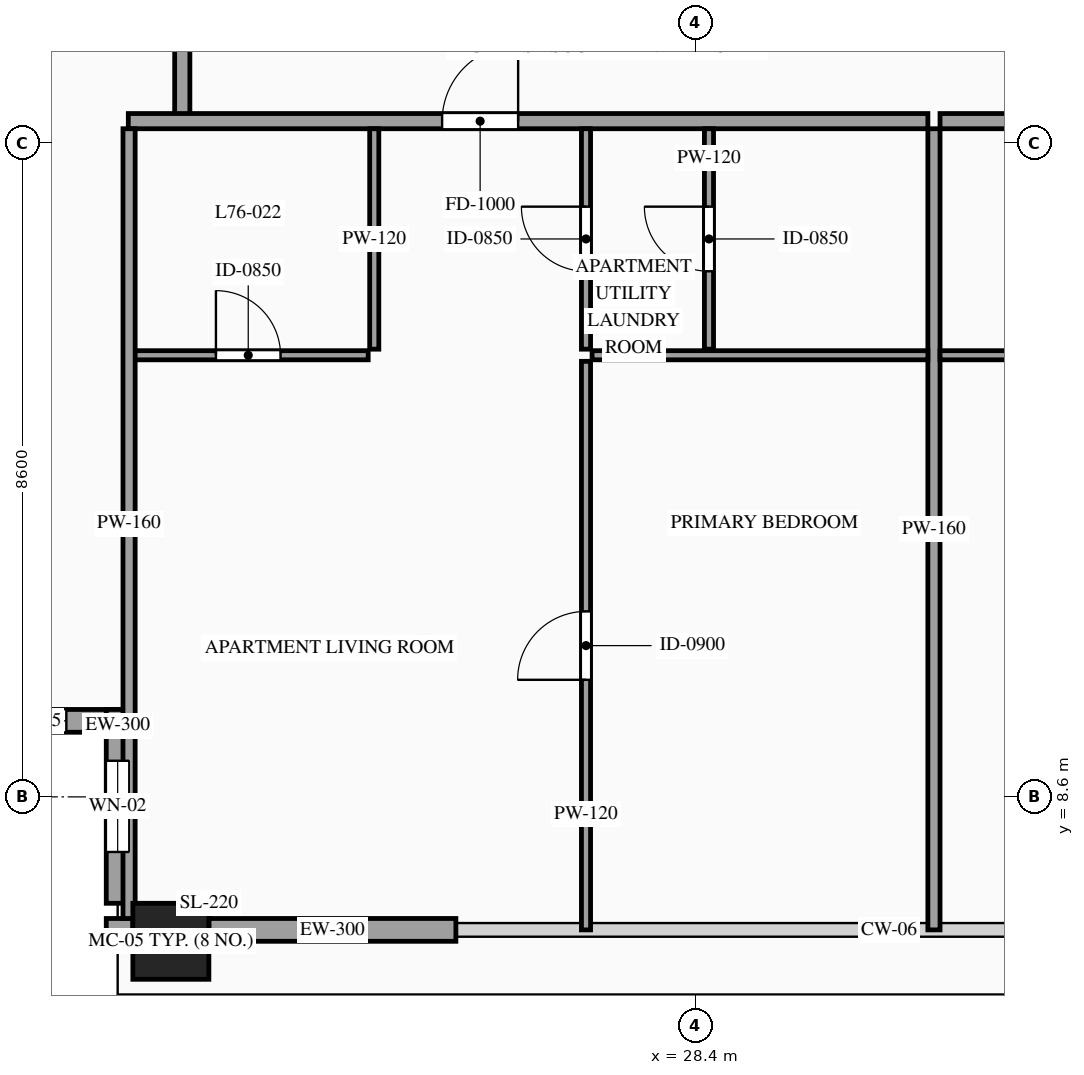
"""IFC4 building model, lengths in metres.
Left out: names, types, materials, properties, quantities, classifications, styles, units other than length and angle.
Written with IfcOpenShell. Run it as: python <this file> out.ifc"""

import sys

from ifc_helpers import new_model, si_unit, direction, frame, frame_2d, origin, origin_2d, place, context, subcontext, project, spatial, rectangle, hollow_rectangle, extrude, source, transform, mapped, element, fill, save


model = new_model("IFC4")
c1 = context("Model", 3, precision=1e-05, world=origin(), true_north=direction((0.0, 1.0)))
c2 = subcontext(c1, "Body", "Model", "MODEL_VIEW")
j1 = project(units=[si_unit("LENGTHUNIT", "METRE"), si_unit("PLANEANGLEUNIT", "RADIAN")], contexts=[c1])
p1 = place(None, origin())
s1 = spatial("IfcSite", under=j1, at=p1, CompositionType="ELEMENT")
p2 = place(p1, origin())
s2 = spatial("IfcBuilding", under=s1, at=p2, CompositionType="ELEMENT")
p3 = place(p2, frame((0.0, 0.0, 285.6)))
s3 = spatial("IfcBuildingStorey", under=s2, at=p3, CompositionType="ELEMENT", Elevation=285.6)
m1 = source(origin(), c2, "Body", "SweptSolid", [
    extrude(hollow_rectangle(XDim=1.0, YDim=1.0, WallThickness=0.048, at=origin_2d()), origin(), (0.0, 0.0, 1.0), 3.5),
])
p4 = place(p3, frame((21.5, 6.7, 0.0), z_axis=(0.0, 0.0, 1.0), x_axis=(1.0, 0.0, 0.0)))
e1 = element("IfcColumn", 1, at=p4, inside=s3, PredefinedType="COLUMN", context=c2, shape_type="MappedRepresentation", body=[
    mapped(m1, transform((0.0, 0.0, 0.0), scale=1.0)),
])
p5 = place(p3, frame((18.4, 9.6, 0.0), z_axis=(0.0, 0.0, 1.0), x_axis=(1.0, 0.0, 0.0)))
e2 = element("IfcWall", 2, at=p5, inside=s3, PredefinedType="SOLIDWALL", context=c2, shape_type="SweptSolid", body=[
    extrude(rectangle(XDim=2.55, YDim=0.3, at=frame_2d((1.275, 0.0))), origin(), (0.0, 0.0, 1.0), 3.28),
])
p6 = place(p5, frame((0.825, 0.0, 0.85)))
e3 = element("IfcOpeningElement", 3, at=p6, cuts=e2, PredefinedType="OPENING", context=c2, shape_type="SweptSolid", body=[
    extrude(rectangle(XDim=0.9, YDim=1.5, at=frame_2d((0.45, 0.75))), frame((0.0, 0.165, 0.0), z_axis=(0.0, -1.0, 0.0), x_axis=(1.0, 0.0, 0.0)), (0.0, 0.0, 1.0), 0.33),
])
p7 = place(p3, frame((20.8, 9.75, 0.0), z_axis=(0.0, 0.0, 1.0), x_axis=(0.0, -1.0, 0.0)))
e4 = element("IfcWall", 4, at=p7, inside=s3, PredefinedType="SOLIDWALL", context=c2, shape_type="SweptSolid", body=[
    extrude(rectangle(XDim=2.55, YDim=0.3, at=frame_2d((1.275, 0.0))), origin(), (0.0, 0.0, 1.0), 3.28),
])
p8 = place(p7, frame((0.675, 0.0, 0.85)))
e5 = element("IfcOpeningElement", 5, at=p8, cuts=e4, PredefinedType="OPENING", context=c2, shape_type="SweptSolid", body=[
    extrude(rectangle(XDim=1.2, YDim=2.1, at=frame_2d((0.6, 1.05))), frame((0.0, 0.165, 0.0), z_axis=(0.0, -1.0, 0.0), x_axis=(1.0, 0.0, 0.0)), (0.0, 0.0, 1.0), 0.33),
])
m2 = source(origin(), c2, "Body", "SweptSolid", [
    extrude(rectangle(XDim=0.35, YDim=0.3, at=frame_2d((0.175, 0.0))), origin(), (0.0, 0.0, 1.0), 3.28),
])
p9 = place(p3, frame((20.65, 6.85, 0.0), z_axis=(0.0, 0.0, 1.0), x_axis=(1.0, 0.0, 0.0)))
e6 = element("IfcWall", 6, at=p9, inside=s3, PredefinedType="SOLIDWALL", context=c2, shape_type="MappedRepresentation", body=[
    mapped(m2, transform((0.0, 0.0, 0.0), scale=1.0)),
])
m3 = source(origin(), c2, "Body", "SweptSolid", [
    extrude(rectangle(XDim=3.25, YDim=0.3, at=frame_2d((1.625, 0.0))), origin(), (0.0, 0.0, 1.0), 2.885),
])
p10 = place(p3, frame((22.0, 6.85, 0.0), z_axis=(0.0, 0.0, 1.0), x_axis=(1.0, 0.0, 0.0)))
e7 = element("IfcWall", 7, at=p10, inside=s3, PredefinedType="SOLIDWALL", context=c2, shape_type="MappedRepresentation", body=[
    mapped(m3, transform((0.0, 0.0, 0.0), scale=1.0)),
])
m4 = source(origin(), c2, "Body", "SweptSolid", [
    extrude(rectangle(XDim=1.7, YDim=0.2, at=frame_2d((0.85, 0.0))), origin(), (0.0, 0.0, 1.0), 3.28),
])
p11 = place(p3, frame((21.65, 17.55, 0.0), z_axis=(0.0, 0.0, 1.0), x_axis=(0.0, 1.0, 0.0)))
e8 = element("IfcWall", 8, at=p11, inside=s3, PredefinedType="PARTITIONING", context=c2, shape_type="MappedRepresentation", body=[
    mapped(m4, transform((0.0, 0.0, 0.0), scale=1.0)),
])
p12 = place(p3, frame((20.94, 17.49, 0.0), z_axis=(0.0, 0.0, 1.0), x_axis=(1.0, 0.0, 0.0)))
e9 = element("IfcWall", 9, at=p12, inside=s3, PredefinedType="PARTITIONING", context=c2, shape_type="SweptSolid", body=[
    extrude(rectangle(XDim=10.52, YDim=0.2, at=frame_2d((5.26, 0.0))), origin(), (0.0, 0.0, 1.0), 3.28),
])
p13 = place(p12, frame((4.129, 0.0, 0.0)))
e10 = element("IfcOpeningElement", 10, at=p13, cuts=e9, PredefinedType="OPENING", context=c2, shape_type="SweptSolid", body=[
    extrude(rectangle(XDim=1.0, YDim=2.2, at=frame_2d((0.5, 1.1))), frame((0.0, 0.115, 0.0), z_axis=(0.0, -1.0, 0.0), x_axis=(1.0, 0.0, 0.0)), (0.0, 0.0, 1.0), 0.23),
])
m5 = source(origin(), c2, "Body", "SweptSolid", [
    extrude(rectangle(XDim=10.54, YDim=0.16, at=frame_2d((5.27, 0.0))), origin(), (0.0, 0.0, 1.0), 3.28),
])
p14 = place(p3, frame((31.54, 6.85, 0.0), z_axis=(0.0, 0.0, 1.0), x_axis=(0.0, 1.0, 0.0)))
e11 = element("IfcWall", 11, at=p14, inside=s3, PredefinedType="PARTITIONING", context=c2, shape_type="MappedRepresentation", body=[
    mapped(m5, transform((0.0, 0.0, 0.0), scale=1.0)),
])
p15 = place(p3, frame((20.94, 14.41, 0.0), z_axis=(0.0, 0.0, 1.0), x_axis=(1.0, 0.0, 0.0)))
e12 = element("IfcWall", 12, at=p15, inside=s3, PredefinedType="PARTITIONING", context=c2, shape_type="SweptSolid", body=[
    extrude(rectangle(XDim=3.156, YDim=0.12, at=frame_2d((1.578, 0.0))), origin(), (0.0, 0.0, 1.0), 3.28),
])
p16 = place(p15, frame((1.153, 0.0, 0.0)))
e13 = element("IfcOpeningElement", 13, at=p16, cuts=e12, PredefinedType="OPENING", context=c2, shape_type="SweptSolid", body=[
    extrude(rectangle(XDim=0.85, YDim=2.1, at=frame_2d((0.425, 1.05))), frame((0.0, 0.075, 0.0), z_axis=(0.0, -1.0, 0.0), x_axis=(1.0, 0.0, 0.0)), (0.0, 0.0, 1.0), 0.15),
])
m6 = source(origin(), c2, "Body", "SweptSolid", [
    extrude(rectangle(XDim=2.9, YDim=0.12, at=frame_2d((1.45, 0.0))), origin(), (0.0, 0.0, 1.0), 3.28),
])
p17 = place(p3, frame((24.176, 14.49, 0.0), z_axis=(0.0, 0.0, 1.0), x_axis=(0.0, 1.0, 0.0)))
e14 = element("IfcWall", 14, at=p17, inside=s3, PredefinedType="PARTITIONING", context=c2, shape_type="MappedRepresentation", body=[
    mapped(m6, transform((0.0, 0.0, 0.0), scale=1.0)),
])
p18 = place(p3, frame((28.58, 14.49, 0.0), z_axis=(0.0, 0.0, 1.0), x_axis=(0.0, 1.0, 0.0)))
e15 = element("IfcWall", 15, at=p18, inside=s3, PredefinedType="PARTITIONING", context=c2, shape_type="SweptSolid", body=[
    extrude(rectangle(XDim=2.9, YDim=0.12, at=frame_2d((1.45, 0.0))), origin(), (0.0, 0.0, 1.0), 3.28),
])
p19 = place(p18, frame((1.025, 0.0, 0.0)))
e16 = element("IfcOpeningElement", 16, at=p19, cuts=e15, PredefinedType="OPENING", context=c2, shape_type="SweptSolid", body=[
    extrude(rectangle(XDim=0.85, YDim=2.1, at=frame_2d((0.425, 1.05))), frame((0.0, 0.075, 0.0), z_axis=(0.0, -1.0, 0.0), x_axis=(1.0, 0.0, 0.0)), (0.0, 0.0, 1.0), 0.15),
])
m7 = source(origin(), c2, "Body", "SweptSolid", [
    extrude(rectangle(XDim=4.418, YDim=0.12, at=frame_2d((2.209, 0.0))), origin(), (0.0, 0.0, 1.0), 3.28),
])
p20 = place(p3, frame((27.042, 14.41, 0.0), z_axis=(0.0, 0.0, 1.0), x_axis=(1.0, 0.0, 0.0)))
e17 = element("IfcWall", 17, at=p20, inside=s3, PredefinedType="PARTITIONING", context=c2, shape_type="MappedRepresentation", body=[
    mapped(m7, transform((0.0, 0.0, 0.0), scale=1.0)),
])
p21 = place(p3, frame((26.962, 6.85, 0.0), z_axis=(0.0, 0.0, 1.0), x_axis=(0.0, 1.0, 0.0)))
e18 = element("IfcWall", 18, at=p21, inside=s3, PredefinedType="PARTITIONING", context=c2, shape_type="SweptSolid", body=[
    extrude(rectangle(XDim=7.48, YDim=0.12, at=frame_2d((3.74, 0.0))), origin(), (0.0, 0.0, 1.0), 3.28),
])
p22 = place(p21, frame((3.29, 0.0, 0.0)))
e19 = element("IfcOpeningElement", 19, at=p22, cuts=e18, PredefinedType="OPENING", context=c2, shape_type="SweptSolid", body=[
    extrude(rectangle(XDim=0.9, YDim=2.15, at=frame_2d((0.45, 1.075))), frame((0.0, 0.075, 0.0), z_axis=(0.0, -1.0, 0.0), x_axis=(1.0, 0.0, 0.0)), (0.0, 0.0, 1.0), 0.15),
])
p23 = place(p3, frame((26.962, 14.49, 0.0), z_axis=(0.0, 0.0, 1.0), x_axis=(0.0, 1.0, 0.0)))
e20 = element("IfcWall", 20, at=p23, inside=s3, PredefinedType="PARTITIONING", context=c2, shape_type="SweptSolid", body=[
    extrude(rectangle(XDim=2.9, YDim=0.12, at=frame_2d((1.45, 0.0))), origin(), (0.0, 0.0, 1.0), 3.28),
])
p24 = place(p23, frame((1.025, 0.0, 0.0)))
e21 = element("IfcOpeningElement", 21, at=p24, cuts=e20, PredefinedType="OPENING", context=c2, shape_type="SweptSolid", body=[
    extrude(rectangle(XDim=0.85, YDim=2.1, at=frame_2d((0.425, 1.05))), frame((0.0, 0.075, 0.0), z_axis=(0.0, -1.0, 0.0), x_axis=(1.0, 0.0, 0.0)), (0.0, 0.0, 1.0), 0.15),
])
p25 = place(p3, frame((31.62, 17.49, 0.0), z_axis=(0.0, 0.0, 1.0), x_axis=(1.0, 0.0, 0.0)))
e22 = element("IfcWall", 22, at=p25, inside=s3, PredefinedType="PARTITIONING", context=c2, shape_type="SweptSolid", body=[
    extrude(rectangle(XDim=10.76, YDim=0.2, at=frame_2d((5.38, 0.0))), origin(), (0.0, 0.0, 1.0), 3.28),
])
p26 = place(p25, frame((4.235, 0.0, 0.0)))
e23 = element("IfcOpeningElement", 23, at=p26, cuts=e22, PredefinedType="OPENING", context=c2, shape_type="SweptSolid", body=[
    extrude(rectangle(XDim=1.0, YDim=2.2, at=frame_2d((0.5, 1.1))), frame((0.0, 0.115, 0.0), z_axis=(0.0, -1.0, 0.0), x_axis=(1.0, 0.0, 0.0)), (0.0, 0.0, 1.0), 0.23),
])
p27 = place(p3, frame((31.62, 14.41, 0.0), z_axis=(0.0, 0.0, 1.0), x_axis=(1.0, 0.0, 0.0)))
e24 = element("IfcWall", 24, at=p27, inside=s3, PredefinedType="PARTITIONING", context=c2, shape_type="SweptSolid", body=[
    extrude(rectangle(XDim=3.228, YDim=0.12, at=frame_2d((1.614, 0.0))), origin(), (0.0, 0.0, 1.0), 3.28),
])
p28 = place(p27, frame((1.189, 0.0, 0.0)))
e25 = element("IfcOpeningElement", 25, at=p28, cuts=e24, PredefinedType="OPENING", context=c2, shape_type="SweptSolid", body=[
    extrude(rectangle(XDim=0.85, YDim=2.1, at=frame_2d((0.425, 1.05))), frame((0.0, 0.075, 0.0), z_axis=(0.0, -1.0, 0.0), x_axis=(1.0, 0.0, 0.0)), (0.0, 0.0, 1.0), 0.15),
])
m8 = source(origin(), c2, "Body", "SweptSolid", [
    extrude(rectangle(XDim=10.39, YDim=0.16, at=frame_2d((5.195, 0.0))), origin(), (0.0, 0.0, 1.0), 3.28),
])
p29 = place(p3, frame((20.95, 7.0, 0.0), z_axis=(0.0, 0.0, 1.0), x_axis=(0.0, 1.0, 0.0)))
e26 = element("IfcWall", 26, at=p29, inside=s3, PredefinedType="PARTITIONING", context=c2, shape_type="MappedRepresentation", body=[
    mapped(m8, transform((0.0, 0.0, 0.0), scale=1.0)),
])
m9 = source(origin(), c2, "Body", "SweptSolid", [
    extrude(rectangle(XDim=0.9, YDim=1.5, at=frame_2d((0.45, 0.75))), frame((0.0, 0.03, 0.0), z_axis=(0.0, -1.0, 0.0), x_axis=(1.0, 0.0, 0.0)), (0.0, 0.0, 1.0), 0.06),
])
p30 = place(p6, origin())
e27 = element("IfcWindow", 27, at=p30, inside=s3, PartitioningType="SINGLE_PANEL", PredefinedType="WINDOW", context=c2, shape_type="MappedRepresentation", body=[
    mapped(m9, transform((0.0, 0.0, 0.0), scale=1.0)),
])
fill(e3, e27)
m10 = source(origin(), c2, "Body", "SweptSolid", [
    extrude(rectangle(XDim=1.2, YDim=2.1, at=frame_2d((0.6, 1.05))), frame((0.0, 0.03, 0.0), z_axis=(0.0, -1.0, 0.0), x_axis=(1.0, 0.0, 0.0)), (0.0, 0.0, 1.0), 0.06),
])
p31 = place(p8, origin())
e28 = element("IfcWindow", 28, at=p31, inside=s3, PartitioningType="SINGLE_PANEL", PredefinedType="WINDOW", context=c2, shape_type="MappedRepresentation", body=[
    mapped(m10, transform((0.0, 0.0, 0.0), scale=1.0)),
])
fill(e5, e28)
m11 = source(origin(), c2, "Body", "SweptSolid", [
    extrude(rectangle(XDim=1.0, YDim=2.2, at=frame_2d((0.5, 1.1))), frame((0.0, 0.025, 0.0), z_axis=(0.0, -1.0, 0.0), x_axis=(1.0, 0.0, 0.0)), (0.0, 0.0, 1.0), 0.05),
])
p32 = place(p13, origin())
e29 = element("IfcDoor", 29, at=p32, inside=s3, OperationType="SINGLE_SWING_RIGHT", PredefinedType="DOOR", context=c2, shape_type="MappedRepresentation", body=[
    mapped(m11, transform((0.0, 0.0, 0.0), scale=1.0)),
])
fill(e10, e29)
m12 = source(origin(), c2, "Body", "SweptSolid", [
    extrude(rectangle(XDim=0.85, YDim=2.1, at=frame_2d((0.425, 1.05))), frame((0.0, 0.025, 0.0), z_axis=(0.0, -1.0, 0.0), x_axis=(1.0, 0.0, 0.0)), (0.0, 0.0, 1.0), 0.05),
])
p33 = place(p16, origin())
e30 = element("IfcDoor", 30, at=p33, inside=s3, OperationType="SINGLE_SWING_LEFT", PredefinedType="DOOR", context=c2, shape_type="MappedRepresentation", body=[
    mapped(m12, transform((0.0, 0.0, 0.0), scale=1.0)),
])
fill(e13, e30)
p34 = place(p19, origin())
e31 = element("IfcDoor", 31, at=p34, inside=s3, OperationType="SINGLE_SWING_RIGHT", PredefinedType="DOOR", context=c2, shape_type="MappedRepresentation", body=[
    mapped(m12, transform((0.0, 0.0, 0.0), scale=1.0)),
])
fill(e16, e31)
m13 = source(origin(), c2, "Body", "SweptSolid", [
    extrude(rectangle(XDim=0.9, YDim=2.15, at=frame_2d((0.45, 1.075))), frame((0.0, 0.025, 0.0), z_axis=(0.0, -1.0, 0.0), x_axis=(1.0, 0.0, 0.0)), (0.0, 0.0, 1.0), 0.05),
])
p35 = place(p22, origin())
e32 = element("IfcDoor", 32, at=p35, inside=s3, OperationType="SINGLE_SWING_LEFT", PredefinedType="DOOR", context=c2, shape_type="MappedRepresentation", body=[
    mapped(m13, transform((0.0, 0.0, 0.0), scale=1.0)),
])
fill(e19, e32)
p36 = place(p24, origin())
e33 = element("IfcDoor", 33, at=p36, inside=s3, OperationType="SINGLE_SWING_RIGHT", PredefinedType="DOOR", context=c2, shape_type="MappedRepresentation", body=[
    mapped(m12, transform((0.0, 0.0, 0.0), scale=1.0)),
])
fill(e21, e33)
save(model, sys.argv[1])
